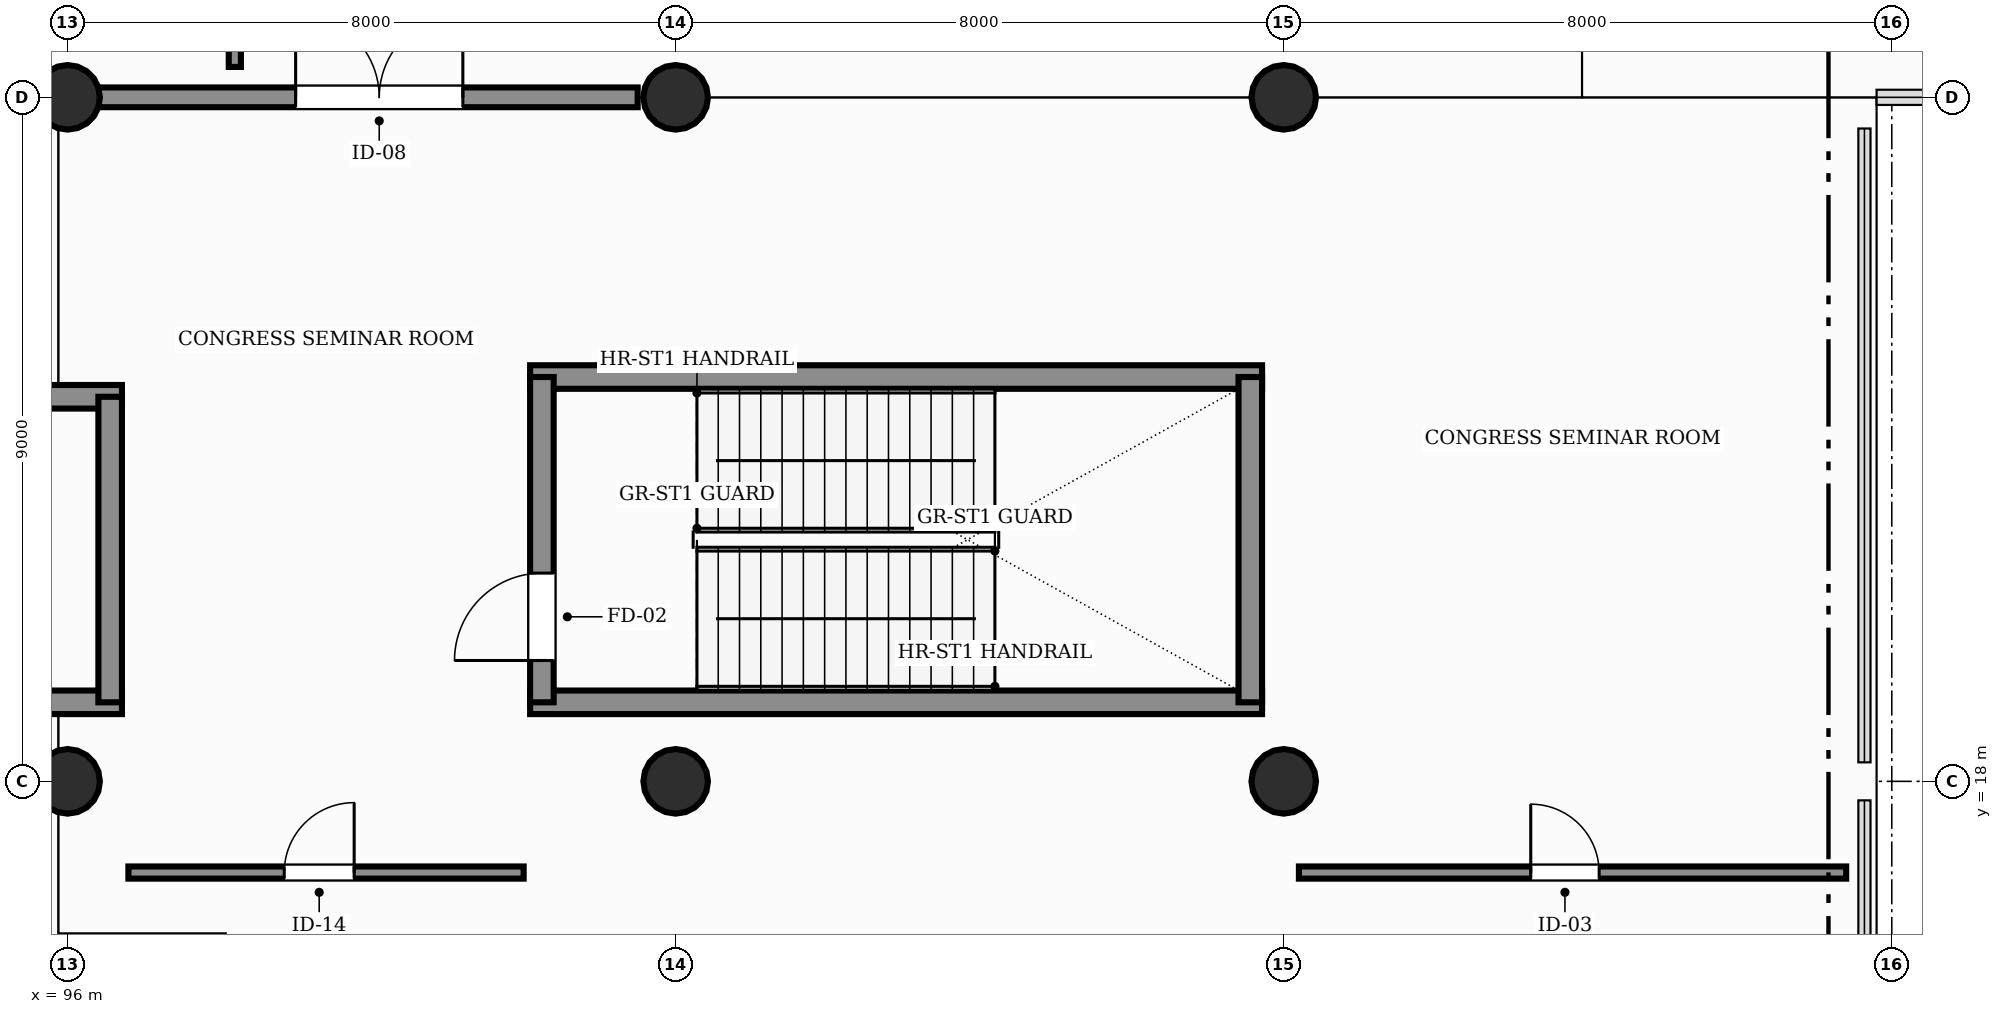
"""IFC4 building model, lengths in metres.
Left out: names, types, materials, properties, quantities, classifications, styles, units other than length and angle.
Written with IfcOpenShell. Run it as: python <this file> out.ifc"""

import sys

from ifc_helpers import new_model, si_unit, direction, frame, frame_2d, origin, origin_2d, place, context, subcontext, project, spatial, rectangle, circle, extrude, element, fill, save


model = new_model("IFC4")
c1 = context("Model", 3, precision=1e-05, world=origin(), true_north=direction((0.0, 1.0)))
c2 = subcontext(c1, "Body", "Model", "MODEL_VIEW")
j1 = project(units=[si_unit("LENGTHUNIT", "METRE"), si_unit("PLANEANGLEUNIT", "RADIAN")], contexts=[c1])
p1 = place(None, origin())
s1 = spatial("IfcSite", under=j1, at=p1, CompositionType="ELEMENT")
p2 = place(p1, origin())
s2 = spatial("IfcBuilding", under=s1, at=p2, CompositionType="ELEMENT")
p3 = place(p2, frame((0.0, 0.0, 6.0)))
s3 = spatial("IfcBuildingStorey", under=s2, at=p3, CompositionType="ELEMENT", Elevation=6.0)
for number, where, z_axis, x_axis in (
    (1, (96.0, 18.0, 0.0), (0.0, 0.0, 1.0), (1.0, 0.0, 0.0)),
    (2, (96.0, 27.0, 0.0), (0.0, 0.0, 1.0), (1.0, 0.0, 0.0)),
    (3, (104.0, 18.0, 0.0), (0.0, 0.0, 1.0), (1.0, 0.0, 0.0)),
    (4, (104.0, 27.0, 0.0), (0.0, 0.0, 1.0), (1.0, 0.0, 0.0)),
    (5, (112.0, 18.0, 0.0), (0.0, 0.0, 1.0), (1.0, 0.0, 0.0)),
    (6, (112.0, 27.0, 0.0), (0.0, 0.0, 1.0), (1.0, 0.0, 0.0)),
):
    element("IfcColumn", number, at=place(p3, frame(where, z_axis=z_axis, x_axis=x_axis)), inside=s3, PredefinedType="COLUMN", context=c2, shape_type="SweptSolid", body=[
        extrude(circle(Radius=0.425, at=origin_2d()), origin(), (0.0, 0.0, 1.0), 5.4),
    ])
for number, where, z_axis, x_axis in (
    (7, (102.085, 19.04, 0.0), (0.0, 0.0, 1.0), (1.0, 0.0, 0.0)),
    (8, (102.085, 23.32, 0.0), (0.0, 0.0, 1.0), (1.0, 0.0, 0.0)),
):
    element("IfcWall", number, at=place(p3, frame(where, z_axis=z_axis, x_axis=x_axis)), inside=s3, PredefinedType="SHEAR", context=c2, shape_type="SweptSolid", body=[
        extrude(rectangle(XDim=9.63, YDim=0.31, at=frame_2d((4.815, 0.0))), origin(), (0.0, 0.0, 1.0), 5.4),
    ])
p4 = place(p3, frame((102.24, 19.04, 0.0), z_axis=(0.0, 0.0, 1.0), x_axis=(0.0, 1.0, 0.0)))
e9 = element("IfcWall", 9, at=p4, inside=s3, PredefinedType="SHEAR", context=c2, shape_type="SweptSolid", body=[
    extrude(rectangle(XDim=4.28, YDim=0.31, at=frame_2d((2.14, 0.0))), origin(), (0.0, 0.0, 1.0), 5.4),
])
p5 = place(p4, frame((0.55, 0.0, 0.0)))
e10 = element("IfcOpeningElement", 10, at=p5, cuts=e9, PredefinedType="OPENING", context=c2, shape_type="SweptSolid", body=[
    extrude(rectangle(XDim=1.15, YDim=2.2, at=frame_2d((0.575, 1.1))), frame((0.0, 0.165, 0.0), z_axis=(0.0, -1.0, 0.0), x_axis=(1.0, 0.0, 0.0)), (0.0, 0.0, 1.0), 0.33),
])
p6 = place(p3, frame((111.56, 19.04, 0.0), z_axis=(0.0, 0.0, 1.0), x_axis=(0.0, 1.0, 0.0)))
e11 = element("IfcWall", 11, at=p6, inside=s3, PredefinedType="SHEAR", context=c2, shape_type="SweptSolid", body=[
    extrude(rectangle(XDim=4.28, YDim=0.31, at=frame_2d((2.14, 0.0))), origin(), (0.0, 0.0, 1.0), 5.4),
])
for number, where, z_axis, x_axis in (
    (12, (87.085, 19.04, 0.0), (0.0, 0.0, 1.0), (1.0, 0.0, 0.0)),
    (13, (87.085, 23.06, 0.0), (0.0, 0.0, 1.0), (1.0, 0.0, 0.0)),
):
    element("IfcWall", number, at=place(p3, frame(where, z_axis=z_axis, x_axis=x_axis)), inside=s3, PredefinedType="SHEAR", context=c2, shape_type="SweptSolid", body=[
        extrude(rectangle(XDim=9.63, YDim=0.31, at=frame_2d((4.815, 0.0))), origin(), (0.0, 0.0, 1.0), 5.4),
    ])
p7 = place(p3, frame((96.56, 19.04, 0.0), z_axis=(0.0, 0.0, 1.0), x_axis=(0.0, 1.0, 0.0)))
e14 = element("IfcWall", 14, at=p7, inside=s3, PredefinedType="SHEAR", context=c2, shape_type="SweptSolid", body=[
    extrude(rectangle(XDim=4.02, YDim=0.31, at=frame_2d((2.01, 0.0))), origin(), (0.0, 0.0, 1.0), 5.4),
])
p8 = place(p3, frame((96.8, 16.8, 0.0), z_axis=(0.0, 0.0, 1.0), x_axis=(1.0, 0.0, 0.0)))
e15 = element("IfcWall", 15, at=p8, inside=s3, PredefinedType="PARTITIONING", context=c2, shape_type="SweptSolid", body=[
    extrude(rectangle(XDim=5.2, YDim=0.16, at=frame_2d((2.6, 0.0))), origin(), (0.0, 0.0, 1.0), 3.85),
])
p9 = place(p8, frame((2.05, 0.0, 0.0)))
e16 = element("IfcOpeningElement", 16, at=p9, cuts=e15, PredefinedType="OPENING", context=c2, shape_type="SweptSolid", body=[
    extrude(rectangle(XDim=0.92, YDim=2.15, at=frame_2d((0.46, 1.075))), frame((0.0, 0.09, 0.0), z_axis=(0.0, -1.0, 0.0), x_axis=(1.0, 0.0, 0.0)), (0.0, 0.0, 1.0), 0.18),
])
p10 = place(p3, frame((112.2, 16.8, 0.0), z_axis=(0.0, 0.0, 1.0), x_axis=(1.0, 0.0, 0.0)))
e17 = element("IfcWall", 17, at=p10, inside=s3, PredefinedType="PARTITIONING", context=c2, shape_type="SweptSolid", body=[
    extrude(rectangle(XDim=7.2, YDim=0.16, at=frame_2d((3.6, 0.0))), origin(), (0.0, 0.0, 1.0), 3.85),
])
p11 = place(p10, frame((3.05, 0.0, 0.0)))
e18 = element("IfcOpeningElement", 18, at=p11, cuts=e17, PredefinedType="OPENING", context=c2, shape_type="SweptSolid", body=[
    extrude(rectangle(XDim=0.9, YDim=2.15, at=frame_2d((0.45, 1.075))), frame((0.0, 0.09, 0.0), z_axis=(0.0, -1.0, 0.0), x_axis=(1.0, 0.0, 0.0)), (0.0, 0.0, 1.0), 0.18),
])
p12 = place(p3, frame((88.6, 27.0, 0.0), z_axis=(0.0, 0.0, 1.0), x_axis=(1.0, 0.0, 0.0)))
e19 = element("IfcWall", 19, at=p12, inside=s3, PredefinedType="SOLIDWALL", context=c2, shape_type="SweptSolid", body=[
    extrude(rectangle(XDim=14.9, YDim=0.26, at=frame_2d((7.45, 0.0))), origin(), (0.0, 0.0, 1.0), 5.4),
])
p13 = place(p12, frame((3.4, 0.0, 0.0)))
e20 = element("IfcOpeningElement", 20, at=p13, cuts=e19, PredefinedType="OPENING", context=c2, shape_type="SweptSolid", body=[
    extrude(rectangle(XDim=2.1, YDim=2.4, at=frame_2d((1.05, 1.2))), frame((0.0, 0.14, 0.0), z_axis=(0.0, -1.0, 0.0), x_axis=(1.0, 0.0, 0.0)), (0.0, 0.0, 1.0), 0.28),
])
p14 = place(p12, frame((10.4, 0.0, 0.0)))
e21 = element("IfcOpeningElement", 21, at=p14, cuts=e19, PredefinedType="OPENING", context=c2, shape_type="SweptSolid", body=[
    extrude(rectangle(XDim=2.2, YDim=2.6, at=frame_2d((1.1, 1.3))), frame((0.0, 0.14, 0.0), z_axis=(0.0, -1.0, 0.0), x_axis=(1.0, 0.0, 0.0)), (0.0, 0.0, 1.0), 0.28),
])
p15 = place(p3, frame((98.2, 27.4, 0.0), z_axis=(0.0, 0.0, 1.0), x_axis=(0.0, 1.0, 0.0)))
e22 = element("IfcWall", 22, at=p15, inside=s3, PredefinedType="PARTITIONING", context=c2, shape_type="SweptSolid", body=[
    extrude(rectangle(XDim=24.2, YDim=0.16, at=frame_2d((12.1, 0.0))), origin(), (0.0, 0.0, 1.0), 3.85),
])
p16 = place(p15, frame((6.5, 0.0, 0.0)))
e23 = element("IfcOpeningElement", 23, at=p16, cuts=e22, PredefinedType="OPENING", context=c2, shape_type="SweptSolid", body=[
    extrude(rectangle(XDim=2.2, YDim=2.6, at=frame_2d((1.1, 1.3))), frame((0.0, 0.09, 0.0), z_axis=(0.0, -1.0, 0.0), x_axis=(1.0, 0.0, 0.0)), (0.0, 0.0, 1.0), 0.18),
])
p17 = place(p15, frame((16.5, 0.0, 0.0)))
e24 = element("IfcOpeningElement", 24, at=p17, cuts=e22, PredefinedType="OPENING", context=c2, shape_type="SweptSolid", body=[
    extrude(rectangle(XDim=2.2, YDim=2.6, at=frame_2d((1.1, 1.3))), frame((0.0, 0.09, 0.0), z_axis=(0.0, -1.0, 0.0), x_axis=(1.0, 0.0, 0.0)), (0.0, 0.0, 1.0), 0.18),
])
p18 = place(p5, origin())
e25 = element("IfcDoor", 25, at=p18, inside=s3, OperationType="SINGLE_SWING_LEFT", PredefinedType="DOOR", context=c2, shape_type="SweptSolid", body=[
    extrude(rectangle(XDim=1.15, YDim=2.2, at=frame_2d((0.575, 1.1))), frame((0.0, 0.025, 0.0), z_axis=(0.0, -1.0, 0.0), x_axis=(1.0, 0.0, 0.0)), (0.0, 0.0, 1.0), 0.05),
])
fill(e10, e25)
p19 = place(p9, origin())
e26 = element("IfcDoor", 26, at=p19, inside=s3, OperationType="SINGLE_SWING_RIGHT", PredefinedType="DOOR", context=c2, shape_type="SweptSolid", body=[
    extrude(rectangle(XDim=0.92, YDim=2.15, at=frame_2d((0.46, 1.075))), frame((0.0, 0.025, 0.0), z_axis=(0.0, -1.0, 0.0), x_axis=(1.0, 0.0, 0.0)), (0.0, 0.0, 1.0), 0.05),
])
fill(e16, e26)
p20 = place(p11, origin())
e27 = element("IfcDoor", 27, at=p20, inside=s3, OperationType="SINGLE_SWING_LEFT", PredefinedType="DOOR", context=c2, shape_type="SweptSolid", body=[
    extrude(rectangle(XDim=0.9, YDim=2.15, at=frame_2d((0.45, 1.075))), frame((0.0, 0.025, 0.0), z_axis=(0.0, -1.0, 0.0), x_axis=(1.0, 0.0, 0.0)), (0.0, 0.0, 1.0), 0.05),
])
fill(e18, e27)
p21 = place(p14, origin())
e28 = element("IfcDoor", 28, at=p21, inside=s3, OperationType="DOUBLE_DOOR_SINGLE_SWING", PredefinedType="DOOR", context=c2, shape_type="SweptSolid", body=[
    extrude(rectangle(XDim=2.2, YDim=2.6, at=frame_2d((1.1, 1.3))), frame((0.0, 0.025, 0.0), z_axis=(0.0, -1.0, 0.0), x_axis=(1.0, 0.0, 0.0)), (0.0, 0.0, 1.0), 0.05),
])
fill(e21, e28)
save(model, sys.argv[1])
